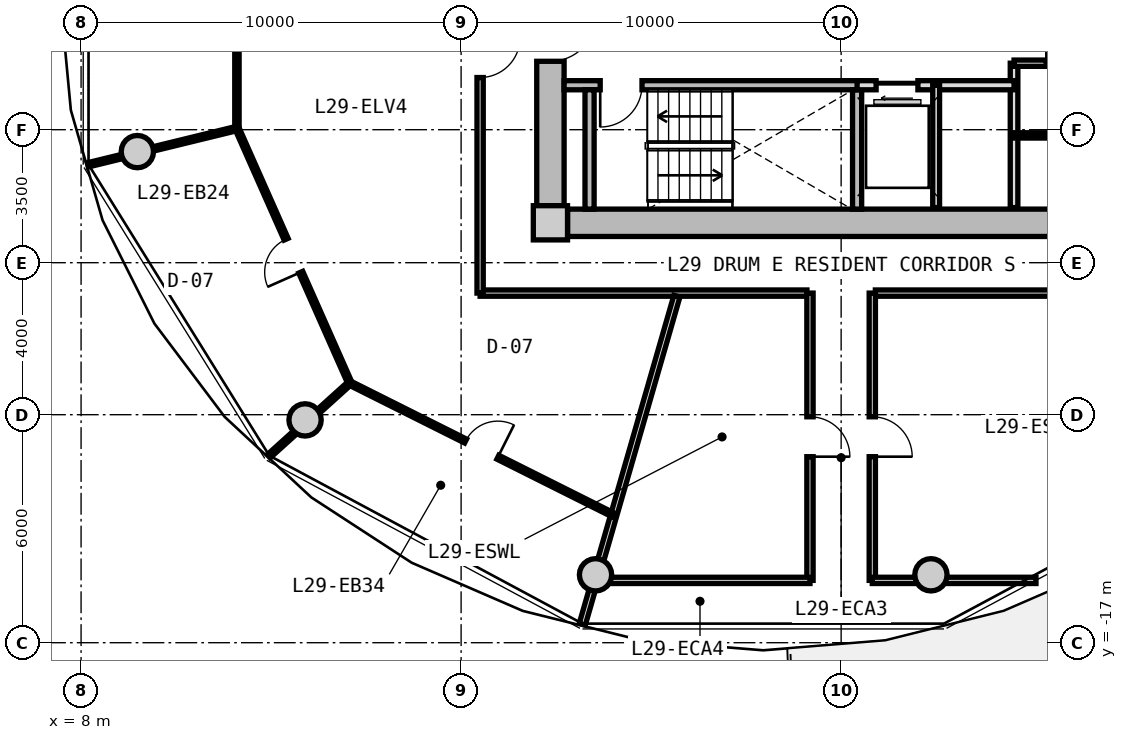
"""IFC4 building model, lengths in metres.
Left out: names, types, materials, properties, quantities, classifications, styles, units other than length and angle.
Written with IfcOpenShell. Run it as: python <this file> out.ifc"""

import sys

from ifc_helpers import new_model, si_unit, direction, frame, frame_2d, origin, origin_2d, place, context, subcontext, project, spatial, rectangle, circle, extrude, source, transform, mapped, element, fill, save


model = new_model("IFC4")
c1 = context("Model", 3, precision=1e-05, world=origin(), true_north=direction((0.0, 1.0)))
c2 = subcontext(c1, "Body", "Model", "MODEL_VIEW")
j1 = project(units=[si_unit("LENGTHUNIT", "METRE"), si_unit("PLANEANGLEUNIT", "RADIAN")], contexts=[c1])
p1 = place(None, origin())
s1 = spatial("IfcSite", under=j1, at=p1, CompositionType="ELEMENT")
p2 = place(p1, origin())
s2 = spatial("IfcBuilding", under=s1, at=p2, CompositionType="ELEMENT")
p3 = place(p2, frame((0.0, 0.0, 96.25)))
s3 = spatial("IfcBuildingStorey", under=s2, at=p3, CompositionType="ELEMENT", Elevation=96.25)
m1 = source(origin(), c2, "Body", "SweptSolid", [
    extrude(rectangle(XDim=0.9, YDim=0.9, at=origin_2d()), origin(), (0.0, 0.0, 1.0), 3.05),
])
p4 = place(p3, frame((20.35, -5.95, 0.0), z_axis=(0.0, 0.0, 1.0), x_axis=(1.0, 0.0, 0.0)))
e1 = element("IfcColumn", 1, at=p4, inside=s3, PredefinedType="COLUMN", context=c2, shape_type="MappedRepresentation", body=[
    mapped(m1, transform((0.0, 0.0, 0.0), x_axis=(1.0, 0.0, 0.0), y_axis=(0.0, 1.0, 0.0), z_axis=(0.0, 0.0, 1.0), scale=1.0)),
])
m2 = source(origin(), c2, "Body", "SweptSolid", [
    extrude(rectangle(XDim=14.4, YDim=0.72, at=frame_2d((7.2, 0.0))), origin(), (0.0, 0.0, 1.0), 2.79),
])
p5 = place(p3, frame((35.2, -5.95, 0.0), z_axis=(0.0, 0.0, 1.0), x_axis=(-1.0, 0.0, 0.0)))
e2 = element("IfcWall", 2, at=p5, inside=s3, PredefinedType="SHEAR", context=c2, shape_type="MappedRepresentation", body=[
    mapped(m2, transform((0.0, 0.0, 0.0), x_axis=(1.0, 0.0, 0.0), y_axis=(0.0, 1.0, 0.0), z_axis=(0.0, 0.0, 1.0), scale=1.0)),
])
m3 = source(origin(), c2, "Body", "SweptSolid", [
    extrude(rectangle(XDim=11.0, YDim=0.72, at=frame_2d((5.5, 0.0))), origin(), (0.0, 0.0, 1.0), 2.79),
])
p6 = place(p3, frame((20.35, -5.5, 0.0), z_axis=(0.0, 0.0, 1.0), x_axis=(0.0, 1.0, 0.0)))
e3 = element("IfcWall", 3, at=p6, inside=s3, PredefinedType="SHEAR", context=c2, shape_type="MappedRepresentation", body=[
    mapped(m3, transform((0.0, 0.0, 0.0), x_axis=(1.0, 0.0, 0.0), y_axis=(0.0, 1.0, 0.0), z_axis=(0.0, 0.0, 1.0), scale=1.0)),
])
p7 = place(p6, frame((3.8, 0.0, 0.0)))
e4 = element("IfcOpeningElement", 4, at=p7, cuts=e3, PredefinedType="OPENING", context=c2, shape_type="SweptSolid", body=[
    extrude(rectangle(XDim=1.2, YDim=2.15, at=frame_2d((0.6, 1.075))), frame((0.0, 0.37, 0.0), z_axis=(0.0, -1.0, 0.0), x_axis=(1.0, 0.0, 0.0)), (0.0, 0.0, 1.0), 0.74),
])
m4 = source(origin(), c2, "Body", "SweptSolid", [
    extrude(circle(Radius=0.425, at=origin_2d()), origin(), (0.0, 0.0, 1.0), 3.05),
])
for number, where, z_axis, x_axis in (
    (5, (9.481, -4.076, 0.0), (0.0, 0.0, 1.0), (1.0, 0.0, 0.0)),
    (6, (13.894, -11.137, 0.0), (0.0, 0.0, 1.0), (1.0, 0.0, 0.0)),
    (7, (21.537, -15.213, 0.0), (0.0, 0.0, 1.0), (1.0, 0.0, 0.0)),
    (8, (30.363, -15.213, 0.0), (0.0, 0.0, 1.0), (1.0, 0.0, 0.0)),
):
    element("IfcColumn", number, at=place(p3, frame(where, z_axis=z_axis, x_axis=x_axis)), inside=s3, PredefinedType="COLUMN", context=c2, shape_type="MappedRepresentation", body=[
        mapped(m4, transform((0.0, 0.0, 0.0), x_axis=(1.0, 0.0, 0.0), y_axis=(0.0, 1.0, 0.0), z_axis=(0.0, 0.0, 1.0), scale=1.0)),
    ])
m5 = source(origin(), c2, "Body", "SweptSolid", [
    extrude(rectangle(XDim=7.83, YDim=0.24, at=frame_2d((3.915, 0.0))), origin(), (0.0, 0.0, 1.0), 2.79),
])
p8 = place(p3, frame((20.71, -2.33, 0.0), z_axis=(0.0, 0.0, 1.0), x_axis=(1.0, 0.0, 0.0)))
e9 = element("IfcWall", 9, at=p8, inside=s3, PredefinedType="PARTITIONING", context=c2, shape_type="MappedRepresentation", body=[
    mapped(m5, transform((0.0, 0.0, 0.0), x_axis=(1.0, 0.0, 0.0), y_axis=(0.0, 1.0, 0.0), z_axis=(0.0, 0.0, 1.0), scale=1.0)),
])
p9 = place(p8, frame((0.95, 0.0, 0.0)))
e10 = element("IfcOpeningElement", 10, at=p9, cuts=e9, PredefinedType="OPENING", context=c2, shape_type="SweptSolid", body=[
    extrude(rectangle(XDim=1.1, YDim=2.15, at=frame_2d((0.55, 1.075))), frame((0.0, 0.13, 0.0), z_axis=(0.0, -1.0, 0.0), x_axis=(1.0, 0.0, 0.0)), (0.0, 0.0, 1.0), 0.26),
])
m6 = source(origin(), c2, "Body", "SweptSolid", [
    extrude(rectangle(XDim=3.14, YDim=0.24, at=frame_2d((1.57, 0.0))), origin(), (0.0, 0.0, 1.0), 2.79),
])
for number, where, z_axis, x_axis in (
    (11, (21.38, -5.59, 0.0), (0.0, 0.0, 1.0), (0.0, 1.0, 0.0)),
    (12, (28.42, -5.59, 0.0), (0.0, 0.0, 1.0), (0.0, 1.0, 0.0)),
):
    element("IfcWall", number, at=place(p3, frame(where, z_axis=z_axis, x_axis=x_axis)), inside=s3, PredefinedType="PARTITIONING", context=c2, shape_type="MappedRepresentation", body=[
        mapped(m6, transform((0.0, 0.0, 0.0), x_axis=(1.0, 0.0, 0.0), y_axis=(0.0, 1.0, 0.0), z_axis=(0.0, 0.0, 1.0), scale=1.0)),
    ])
m7 = source(origin(), c2, "Body", "SweptSolid", [
    extrude(rectangle(XDim=3.8, YDim=0.2, at=frame_2d((1.9, 0.0))), origin(), (0.0, 0.0, 1.0), 2.775),
])
p10 = place(p3, frame((32.55, -5.55, 0.0), z_axis=(0.0, 0.0, 1.0), x_axis=(0.0, 1.0, 0.0)))
e13 = element("IfcWall", 13, at=p10, inside=s3, PredefinedType="PARTITIONING", context=c2, shape_type="MappedRepresentation", body=[
    mapped(m7, transform((0.0, 0.0, 0.0), x_axis=(1.0, 0.0, 0.0), y_axis=(0.0, 1.0, 0.0), z_axis=(0.0, 0.0, 1.0), scale=1.0)),
])
m8 = source(origin(), c2, "Body", "SweptSolid", [
    extrude(rectangle(XDim=4.13, YDim=0.24, at=frame_2d((2.065, 0.0))), origin(), (0.0, 0.0, 1.0), 2.775),
])
p11 = place(p3, frame((28.42, -2.33, 0.0), z_axis=(0.0, 0.0, 1.0), x_axis=(1.0, 0.0, 0.0)))
e14 = element("IfcWall", 14, at=p11, inside=s3, PredefinedType="PARTITIONING", context=c2, shape_type="MappedRepresentation", body=[
    mapped(m8, transform((0.0, 0.0, 0.0), x_axis=(1.0, 0.0, 0.0), y_axis=(0.0, 1.0, 0.0), z_axis=(0.0, 0.0, 1.0), scale=1.0)),
])
p12 = place(p11, frame((0.5, 0.0, 0.0)))
e15 = element("IfcOpeningElement", 15, at=p12, cuts=e14, PredefinedType="OPENING", context=c2, shape_type="SweptSolid", body=[
    extrude(rectangle(XDim=1.1, YDim=2.2, at=frame_2d((0.55, 1.1))), frame((0.0, 0.13, 0.0), z_axis=(0.0, -1.0, 0.0), x_axis=(1.0, 0.0, 0.0)), (0.0, 0.0, 1.0), 0.26),
])
m9 = source(origin(), c2, "Body", "SweptSolid", [
    extrude(rectangle(XDim=3.22, YDim=0.18, at=frame_2d((1.61, 0.0))), origin(), (0.0, 0.0, 1.0), 2.775),
])
p13 = place(p3, frame((30.5, -5.55, 0.0), z_axis=(0.0, 0.0, 1.0), x_axis=(0.0, 1.0, 0.0)))
e16 = element("IfcWall", 16, at=p13, inside=s3, PredefinedType="PARTITIONING", context=c2, shape_type="MappedRepresentation", body=[
    mapped(m9, transform((0.0, 0.0, 0.0), x_axis=(1.0, 0.0, 0.0), y_axis=(0.0, 1.0, 0.0), z_axis=(0.0, 0.0, 1.0), scale=1.0)),
])
m10 = source(origin(), c2, "Body", "SweptSolid", [
    extrude(rectangle(XDim=2.7, YDim=0.165, at=frame_2d((1.35, 0.0))), origin(), (0.0, 0.0, 1.0), 2.775),
])
p14 = place(p3, frame((32.55, -1.75, 0.0), z_axis=(0.0, 0.0, 1.0), x_axis=(1.0, 0.0, 0.0)))
e17 = element("IfcWall", 17, at=p14, inside=s3, PredefinedType="PARTITIONING", context=c2, shape_type="MappedRepresentation", body=[
    mapped(m10, transform((0.0, 0.0, 0.0), x_axis=(1.0, 0.0, 0.0), y_axis=(0.0, 1.0, 0.0), z_axis=(0.0, 0.0, 1.0), scale=1.0)),
])
p15 = place(p14, frame((0.85, 0.0, 0.0)))
e18 = element("IfcOpeningElement", 18, at=p15, cuts=e17, PredefinedType="OPENING", context=c2, shape_type="SweptSolid", body=[
    extrude(rectangle(XDim=0.925, YDim=2.1, at=frame_2d((0.462, 1.05))), frame((0.0, 0.093, 0.0), z_axis=(0.0, -1.0, 0.0), x_axis=(1.0, 0.0, 0.0)), (0.0, 0.0, 1.0), 0.185),
])
m11 = source(origin(), c2, "Body", "SweptSolid", [
    extrude(rectangle(XDim=2.7, YDim=0.14, at=frame_2d((1.35, 0.0))), origin(), (0.0, 0.0, 1.0), 2.775),
])
p16 = place(p3, frame((32.55, -3.65, 0.0), z_axis=(0.0, 0.0, 1.0), x_axis=(1.0, 0.0, 0.0)))
e19 = element("IfcWall", 19, at=p16, inside=s3, PredefinedType="PARTITIONING", context=c2, shape_type="MappedRepresentation", body=[
    mapped(m11, transform((0.0, 0.0, 0.0), x_axis=(1.0, 0.0, 0.0), y_axis=(0.0, 1.0, 0.0), z_axis=(0.0, 0.0, 1.0), scale=1.0)),
])
m12 = source(origin(), c2, "Body", "SweptSolid", [
    extrude(rectangle(XDim=8.6, YDim=0.165, at=frame_2d((4.3, 0.0))), origin(), (0.0, 0.0, 1.0), 2.775),
])
for number, where, z_axis, x_axis in (
    (20, (37.5, -7.8, 0.0), (0.0, 0.0, 1.0), (-1.0, 0.0, 0.0)),
    (21, (27.1, -7.8, 0.0), (0.0, 0.0, 1.0), (-1.0, 0.0, 0.0)),
):
    element("IfcWall", number, at=place(p3, frame(where, z_axis=z_axis, x_axis=x_axis)), inside=s3, PredefinedType="PARTITIONING", context=c2, shape_type="MappedRepresentation", body=[
        mapped(m12, transform((0.0, 0.0, 0.0), x_axis=(1.0, 0.0, 0.0), y_axis=(0.0, 1.0, 0.0), z_axis=(0.0, 0.0, 1.0), scale=1.0)),
    ])
m13 = source(origin(), c2, "Body", "SweptSolid", [
    extrude(rectangle(XDim=15.6, YDim=0.165, at=frame_2d((7.8, 0.0))), origin(), (0.0, 0.0, 1.0), 2.775),
])
p17 = place(p3, frame((18.5, -7.8, 0.0), z_axis=(0.0, 0.0, 1.0), x_axis=(0.0, 1.0, 0.0)))
e22 = element("IfcWall", 22, at=p17, inside=s3, PredefinedType="PARTITIONING", context=c2, shape_type="MappedRepresentation", body=[
    mapped(m13, transform((0.0, 0.0, 0.0), x_axis=(1.0, 0.0, 0.0), y_axis=(0.0, 1.0, 0.0), z_axis=(0.0, 0.0, 1.0), scale=1.0)),
])
p18 = place(p17, frame((5.673, 0.0, 0.0)))
e23 = element("IfcOpeningElement", 23, at=p18, cuts=e22, PredefinedType="OPENING", context=c2, shape_type="SweptSolid", body=[
    extrude(rectangle(XDim=1.05, YDim=2.15, at=frame_2d((0.525, 1.075))), frame((0.0, 0.093, 0.0), z_axis=(0.0, -1.0, 0.0), x_axis=(1.0, 0.0, 0.0)), (0.0, 0.0, 1.0), 0.185),
])
m14 = source(origin(), c2, "Body", "SweptSolid", [
    extrude(rectangle(XDim=8.989, YDim=0.165, at=frame_2d((4.495, 0.0))), origin(), (0.0, 0.0, 1.0), 2.275),
])
p19 = place(p3, frame((23.678, -7.88, 0.0), z_axis=(0.0, 0.0, 1.0), x_axis=(-0.27702323008, -0.960863221274, 0.0)))
e24 = element("IfcWall", 24, at=p19, inside=s3, PredefinedType="PARTITIONING", context=c2, shape_type="MappedRepresentation", body=[
    mapped(m14, transform((0.0, 0.0, 0.0), x_axis=(1.0, 0.0, 0.0), y_axis=(0.0, 1.0, 0.0), z_axis=(0.0, 0.0, 1.0), scale=1.0)),
])
m15 = source(origin(), c2, "Body", "SweptSolid", [
    extrude(rectangle(XDim=7.56, YDim=0.165, at=frame_2d((3.78, 0.0))), origin(), (0.0, 0.0, 1.0), 2.775),
])
p20 = place(p3, frame((27.18, -15.36, 0.0), z_axis=(0.0, 0.0, 1.0), x_axis=(0.0, 1.0, 0.0)))
e25 = element("IfcWall", 25, at=p20, inside=s3, PredefinedType="PARTITIONING", context=c2, shape_type="MappedRepresentation", body=[
    mapped(m15, transform((0.0, 0.0, 0.0), x_axis=(1.0, 0.0, 0.0), y_axis=(0.0, 1.0, 0.0), z_axis=(0.0, 0.0, 1.0), scale=1.0)),
])
p21 = place(p20, frame((3.255, 0.0, 0.0)))
e26 = element("IfcOpeningElement", 26, at=p21, cuts=e25, PredefinedType="OPENING", context=c2, shape_type="SweptSolid", body=[
    extrude(rectangle(XDim=1.05, YDim=2.15, at=frame_2d((0.525, 1.075))), frame((0.0, 0.093, 0.0), z_axis=(0.0, -1.0, 0.0), x_axis=(1.0, 0.0, 0.0)), (0.0, 0.0, 1.0), 0.185),
])
m16 = source(origin(), c2, "Body", "SweptSolid", [
    extrude(rectangle(XDim=5.814, YDim=0.165, at=frame_2d((2.907, 0.0))), origin(), (0.0, 0.0, 1.0), 2.275),
])
p22 = place(p3, frame((21.366, -15.36, 0.0), z_axis=(0.0, 0.0, 1.0), x_axis=(1.0, 0.0, 0.0)))
e27 = element("IfcWall", 27, at=p22, inside=s3, PredefinedType="PARTITIONING", context=c2, shape_type="MappedRepresentation", body=[
    mapped(m16, transform((0.0, 0.0, 0.0), x_axis=(1.0, 0.0, 0.0), y_axis=(0.0, 1.0, 0.0), z_axis=(0.0, 0.0, 1.0), scale=1.0)),
])
p23 = place(p3, frame((28.82, -15.36, 0.0), z_axis=(0.0, 0.0, 1.0), x_axis=(0.0, 1.0, 0.0)))
e28 = element("IfcWall", 28, at=p23, inside=s3, PredefinedType="PARTITIONING", context=c2, shape_type="MappedRepresentation", body=[
    mapped(m15, transform((0.0, 0.0, 0.0), x_axis=(1.0, 0.0, 0.0), y_axis=(0.0, 1.0, 0.0), z_axis=(0.0, 0.0, 1.0), scale=1.0)),
])
p24 = place(p23, frame((3.255, 0.0, 0.0)))
e29 = element("IfcOpeningElement", 29, at=p24, cuts=e28, PredefinedType="OPENING", context=c2, shape_type="SweptSolid", body=[
    extrude(rectangle(XDim=1.05, YDim=2.15, at=frame_2d((0.525, 1.075))), frame((0.0, 0.093, 0.0), z_axis=(0.0, -1.0, 0.0), x_axis=(1.0, 0.0, 0.0)), (0.0, 0.0, 1.0), 0.185),
])
m17 = source(origin(), c2, "Body", "SweptSolid", [
    extrude(rectangle(XDim=4.307, YDim=0.165, at=frame_2d((2.153, 0.0))), origin(), (0.0, 0.0, 1.0), 2.275),
])
p25 = place(p3, frame((28.82, -15.36, 0.0), z_axis=(0.0, 0.0, 1.0), x_axis=(1.0, 0.0, 0.0)))
e30 = element("IfcWall", 30, at=p25, inside=s3, PredefinedType="PARTITIONING", context=c2, shape_type="MappedRepresentation", body=[
    mapped(m17, transform((0.0, 0.0, 0.0), x_axis=(1.0, 0.0, 0.0), y_axis=(0.0, 1.0, 0.0), z_axis=(0.0, 0.0, 1.0), scale=1.0)),
])
m18 = source(origin(), c2, "Body", "SweptSolid", [
    extrude(rectangle(XDim=6.935, YDim=0.115, at=frame_2d((3.468, 0.0))), origin(), (0.0, 0.0, 1.0), 2.775),
])
p26 = place(p3, frame((12.101, 3.468, 0.0), z_axis=(0.0, 0.0, 1.0), x_axis=(0.0, -1.0, 0.0)))
e31 = element("IfcWall", 31, at=p26, inside=s3, PredefinedType="PARTITIONING", context=c2, shape_type="MappedRepresentation", body=[
    mapped(m18, transform((0.0, 0.0, 0.0), x_axis=(1.0, 0.0, 0.0), y_axis=(0.0, 1.0, 0.0), z_axis=(0.0, 0.0, 1.0), scale=1.0)),
])
p27 = place(p26, frame((2.993, 0.0, 0.0)))
e32 = element("IfcOpeningElement", 32, at=p27, cuts=e31, PredefinedType="OPENING", context=c2, shape_type="SweptSolid", body=[
    extrude(rectangle(XDim=0.95, YDim=2.1, at=frame_2d((0.475, 1.05))), frame((0.0, 0.067, 0.0), z_axis=(0.0, -1.0, 0.0), x_axis=(1.0, 0.0, 0.0)), (0.0, 0.0, 1.0), 0.135),
])
m19 = source(origin(), c2, "Body", "SweptSolid", [
    extrude(rectangle(XDim=7.326, YDim=0.115, at=frame_2d((3.663, 0.0))), origin(), (0.0, 0.0, 1.0), 2.775),
])
p28 = place(p3, frame((12.104, -3.467, 0.0), z_axis=(0.0, 0.0, 1.0), x_axis=(0.405263245425, -0.914200033859, 0.0)))
e33 = element("IfcWall", 33, at=p28, inside=s3, PredefinedType="PARTITIONING", context=c2, shape_type="MappedRepresentation", body=[
    mapped(m19, transform((0.0, 0.0, 0.0), x_axis=(1.0, 0.0, 0.0), y_axis=(0.0, 1.0, 0.0), z_axis=(0.0, 0.0, 1.0), scale=1.0)),
])
p29 = place(p28, frame((3.188, 0.0, 0.0)))
e34 = element("IfcOpeningElement", 34, at=p29, cuts=e33, PredefinedType="OPENING", context=c2, shape_type="SweptSolid", body=[
    extrude(rectangle(XDim=0.95, YDim=2.1, at=frame_2d((0.475, 1.05))), frame((0.0, 0.067, 0.0), z_axis=(0.0, -1.0, 0.0), x_axis=(1.0, 0.0, 0.0)), (0.0, 0.0, 1.0), 0.135),
])
m20 = source(origin(), c2, "Body", "SweptSolid", [
    extrude(rectangle(XDim=4.042, YDim=0.115, at=frame_2d((2.021, 0.0))), origin(), (0.0, 0.0, 1.0), 2.275),
])
p30 = place(p3, frame((12.104, -3.467, 0.0), z_axis=(0.0, 0.0, 1.0), x_axis=(-0.971460277747, -0.237202295014, 0.0)))
e35 = element("IfcWall", 35, at=p30, inside=s3, PredefinedType="PARTITIONING", context=c2, shape_type="MappedRepresentation", body=[
    mapped(m20, transform((0.0, 0.0, 0.0), x_axis=(1.0, 0.0, 0.0), y_axis=(0.0, 1.0, 0.0), z_axis=(0.0, 0.0, 1.0), scale=1.0)),
])
m21 = source(origin(), c2, "Body", "SweptSolid", [
    extrude(rectangle(XDim=7.767, YDim=0.115, at=frame_2d((3.884, 0.0))), origin(), (0.0, 0.0, 1.0), 2.775),
])
p31 = place(p3, frame((15.07, -10.167, 0.0), z_axis=(0.0, 0.0, 1.0), x_axis=(0.894188177352, -0.447691303783, 0.0)))
e36 = element("IfcWall", 36, at=p31, inside=s3, PredefinedType="PARTITIONING", context=c2, shape_type="MappedRepresentation", body=[
    mapped(m21, transform((0.0, 0.0, 0.0), x_axis=(1.0, 0.0, 0.0), y_axis=(0.0, 1.0, 0.0), z_axis=(0.0, 0.0, 1.0), scale=1.0)),
])
p32 = place(p31, frame((3.409, 0.0, 0.0)))
e37 = element("IfcOpeningElement", 37, at=p32, cuts=e36, PredefinedType="OPENING", context=c2, shape_type="SweptSolid", body=[
    extrude(rectangle(XDim=0.95, YDim=2.1, at=frame_2d((0.475, 1.05))), frame((0.0, 0.067, 0.0), z_axis=(0.0, -1.0, 0.0), x_axis=(1.0, 0.0, 0.0)), (0.0, 0.0, 1.0), 0.135),
])
m22 = source(origin(), c2, "Body", "SweptSolid", [
    extrude(rectangle(XDim=2.871, YDim=0.115, at=frame_2d((1.435, 0.0))), origin(), (0.0, 0.0, 1.0), 2.275),
])
p33 = place(p3, frame((15.07, -10.167, 0.0), z_axis=(0.0, 0.0, 1.0), x_axis=(-0.742125841552, -0.670260572688, 0.0)))
e38 = element("IfcWall", 38, at=p33, inside=s3, PredefinedType="PARTITIONING", context=c2, shape_type="MappedRepresentation", body=[
    mapped(m22, transform((0.0, 0.0, 0.0), x_axis=(1.0, 0.0, 0.0), y_axis=(0.0, 1.0, 0.0), z_axis=(0.0, 0.0, 1.0), scale=1.0)),
])
m23 = source(origin(), c2, "Body", "SweptSolid", [
    extrude(rectangle(XDim=1.1, YDim=2.15, at=frame_2d((0.55, 1.075))), frame((0.0, 0.025, 0.0), z_axis=(0.0, -1.0, 0.0), x_axis=(1.0, 0.0, 0.0)), (0.0, 0.0, 1.0), 0.05),
])
p34 = place(p9, frame((1.1, 0.0, 0.0), z_axis=(0.0, 0.0, 1.0), x_axis=(-1.0, 0.0, 0.0)))
e39 = element("IfcDoor", 39, at=p34, inside=s3, OperationType="SINGLE_SWING_RIGHT", PredefinedType="DOOR", context=c2, shape_type="MappedRepresentation", body=[
    mapped(m23, transform((0.0, 0.0, 0.0), x_axis=(1.0, 0.0, 0.0), y_axis=(0.0, 1.0, 0.0), z_axis=(0.0, 0.0, 1.0), scale=1.0)),
])
fill(e10, e39)
m24 = source(origin(), c2, "Body", "SweptSolid", [
    extrude(rectangle(XDim=1.2, YDim=2.15, at=frame_2d((0.6, 1.075))), frame((0.0, 0.025, 0.0), z_axis=(0.0, -1.0, 0.0), x_axis=(1.0, 0.0, 0.0)), (0.0, 0.0, 1.0), 0.05),
])
p35 = place(p7, frame((1.2, 0.0, 0.0), z_axis=(0.0, 0.0, 1.0), x_axis=(-1.0, 0.0, 0.0)))
e40 = element("IfcDoor", 40, at=p35, inside=s3, OperationType="SINGLE_SWING_LEFT", PredefinedType="DOOR", context=c2, shape_type="MappedRepresentation", body=[
    mapped(m24, transform((0.0, 0.0, 0.0), x_axis=(1.0, 0.0, 0.0), y_axis=(0.0, 1.0, 0.0), z_axis=(0.0, 0.0, 1.0), scale=1.0)),
])
fill(e4, e40)
m25 = source(origin(), c2, "Body", "SweptSolid", [
    extrude(rectangle(XDim=1.1, YDim=2.2, at=frame_2d((0.55, 1.1))), frame((0.0, 0.025, 0.0), z_axis=(0.0, -1.0, 0.0), x_axis=(1.0, 0.0, 0.0)), (0.0, 0.0, 1.0), 0.05),
])
p36 = place(p12, frame((1.1, 0.0, 0.0), z_axis=(0.0, 0.0, 1.0), x_axis=(-1.0, 0.0, 0.0)))
e41 = element("IfcDoor", 41, at=p36, inside=s3, OperationType="SLIDING_TO_LEFT", PredefinedType="DOOR", context=c2, shape_type="MappedRepresentation", body=[
    mapped(m25, transform((0.0, 0.0, 0.0), x_axis=(1.0, 0.0, 0.0), y_axis=(0.0, 1.0, 0.0), z_axis=(0.0, 0.0, 1.0), scale=1.0)),
])
fill(e15, e41)
m26 = source(origin(), c2, "Body", "SweptSolid", [
    extrude(rectangle(XDim=0.925, YDim=2.1, at=frame_2d((0.462, 1.05))), frame((0.0, 0.025, 0.0), z_axis=(0.0, -1.0, 0.0), x_axis=(1.0, 0.0, 0.0)), (0.0, 0.0, 1.0), 0.05),
])
p37 = place(p15, origin())
e42 = element("IfcDoor", 42, at=p37, inside=s3, OperationType="SINGLE_SWING_LEFT", PredefinedType="DOOR", context=c2, shape_type="MappedRepresentation", body=[
    mapped(m26, transform((0.0, 0.0, 0.0), x_axis=(1.0, 0.0, 0.0), y_axis=(0.0, 1.0, 0.0), z_axis=(0.0, 0.0, 1.0), scale=1.0)),
])
fill(e18, e42)
m27 = source(origin(), c2, "Body", "SweptSolid", [
    extrude(rectangle(XDim=1.05, YDim=2.15, at=frame_2d((0.525, 1.075))), frame((0.0, 0.025, 0.0), z_axis=(0.0, -1.0, 0.0), x_axis=(1.0, 0.0, 0.0)), (0.0, 0.0, 1.0), 0.05),
])
p38 = place(p21, frame((1.05, 0.0, 0.0), z_axis=(0.0, 0.0, 1.0), x_axis=(-1.0, 0.0, 0.0)))
e43 = element("IfcDoor", 43, at=p38, inside=s3, OperationType="SINGLE_SWING_RIGHT", PredefinedType="DOOR", context=c2, shape_type="MappedRepresentation", body=[
    mapped(m27, transform((0.0, 0.0, 0.0), x_axis=(1.0, 0.0, 0.0), y_axis=(0.0, 1.0, 0.0), z_axis=(0.0, 0.0, 1.0), scale=1.0)),
])
fill(e26, e43)
p39 = place(p24, frame((1.05, 0.0, 0.0), z_axis=(0.0, 0.0, 1.0), x_axis=(-1.0, 0.0, 0.0)))
e44 = element("IfcDoor", 44, at=p39, inside=s3, OperationType="SINGLE_SWING_RIGHT", PredefinedType="DOOR", context=c2, shape_type="MappedRepresentation", body=[
    mapped(m27, transform((0.0, 0.0, 0.0), x_axis=(1.0, 0.0, 0.0), y_axis=(0.0, 1.0, 0.0), z_axis=(0.0, 0.0, 1.0), scale=1.0)),
])
fill(e29, e44)
p40 = place(p18, frame((1.05, 0.0, 0.0), z_axis=(0.0, 0.0, 1.0), x_axis=(-1.0, 0.0, 0.0)))
e45 = element("IfcDoor", 45, at=p40, inside=s3, OperationType="SINGLE_SWING_LEFT", PredefinedType="DOOR", context=c2, shape_type="MappedRepresentation", body=[
    mapped(m27, transform((0.0, 0.0, 0.0), x_axis=(1.0, 0.0, 0.0), y_axis=(0.0, 1.0, 0.0), z_axis=(0.0, 0.0, 1.0), scale=1.0)),
])
fill(e23, e45)
m28 = source(origin(), c2, "Body", "SweptSolid", [
    extrude(rectangle(XDim=0.95, YDim=2.1, at=frame_2d((0.475, 1.05))), frame((0.0, 0.025, 0.0), z_axis=(0.0, -1.0, 0.0), x_axis=(1.0, 0.0, 0.0)), (0.0, 0.0, 1.0), 0.05),
])
p41 = place(p29, frame((0.95, 0.0, 0.0), z_axis=(0.0, 0.0, 1.0), x_axis=(-1.0, 0.0, 0.0)))
e46 = element("IfcDoor", 46, at=p41, inside=s3, OperationType="SINGLE_SWING_LEFT", PredefinedType="DOOR", context=c2, shape_type="MappedRepresentation", body=[
    mapped(m28, transform((0.0, 0.0, 0.0), x_axis=(1.0, 0.0, 0.0), y_axis=(0.0, 1.0, 0.0), z_axis=(0.0, 0.0, 1.0), scale=1.0)),
])
fill(e34, e46)
p42 = place(p32, origin())
e47 = element("IfcDoor", 47, at=p42, inside=s3, OperationType="SINGLE_SWING_RIGHT", PredefinedType="DOOR", context=c2, shape_type="MappedRepresentation", body=[
    mapped(m28, transform((0.0, 0.0, 0.0), x_axis=(1.0, 0.0, 0.0), y_axis=(0.0, 1.0, 0.0), z_axis=(0.0, 0.0, 1.0), scale=1.0)),
])
fill(e37, e47)
save(model, sys.argv[1])
